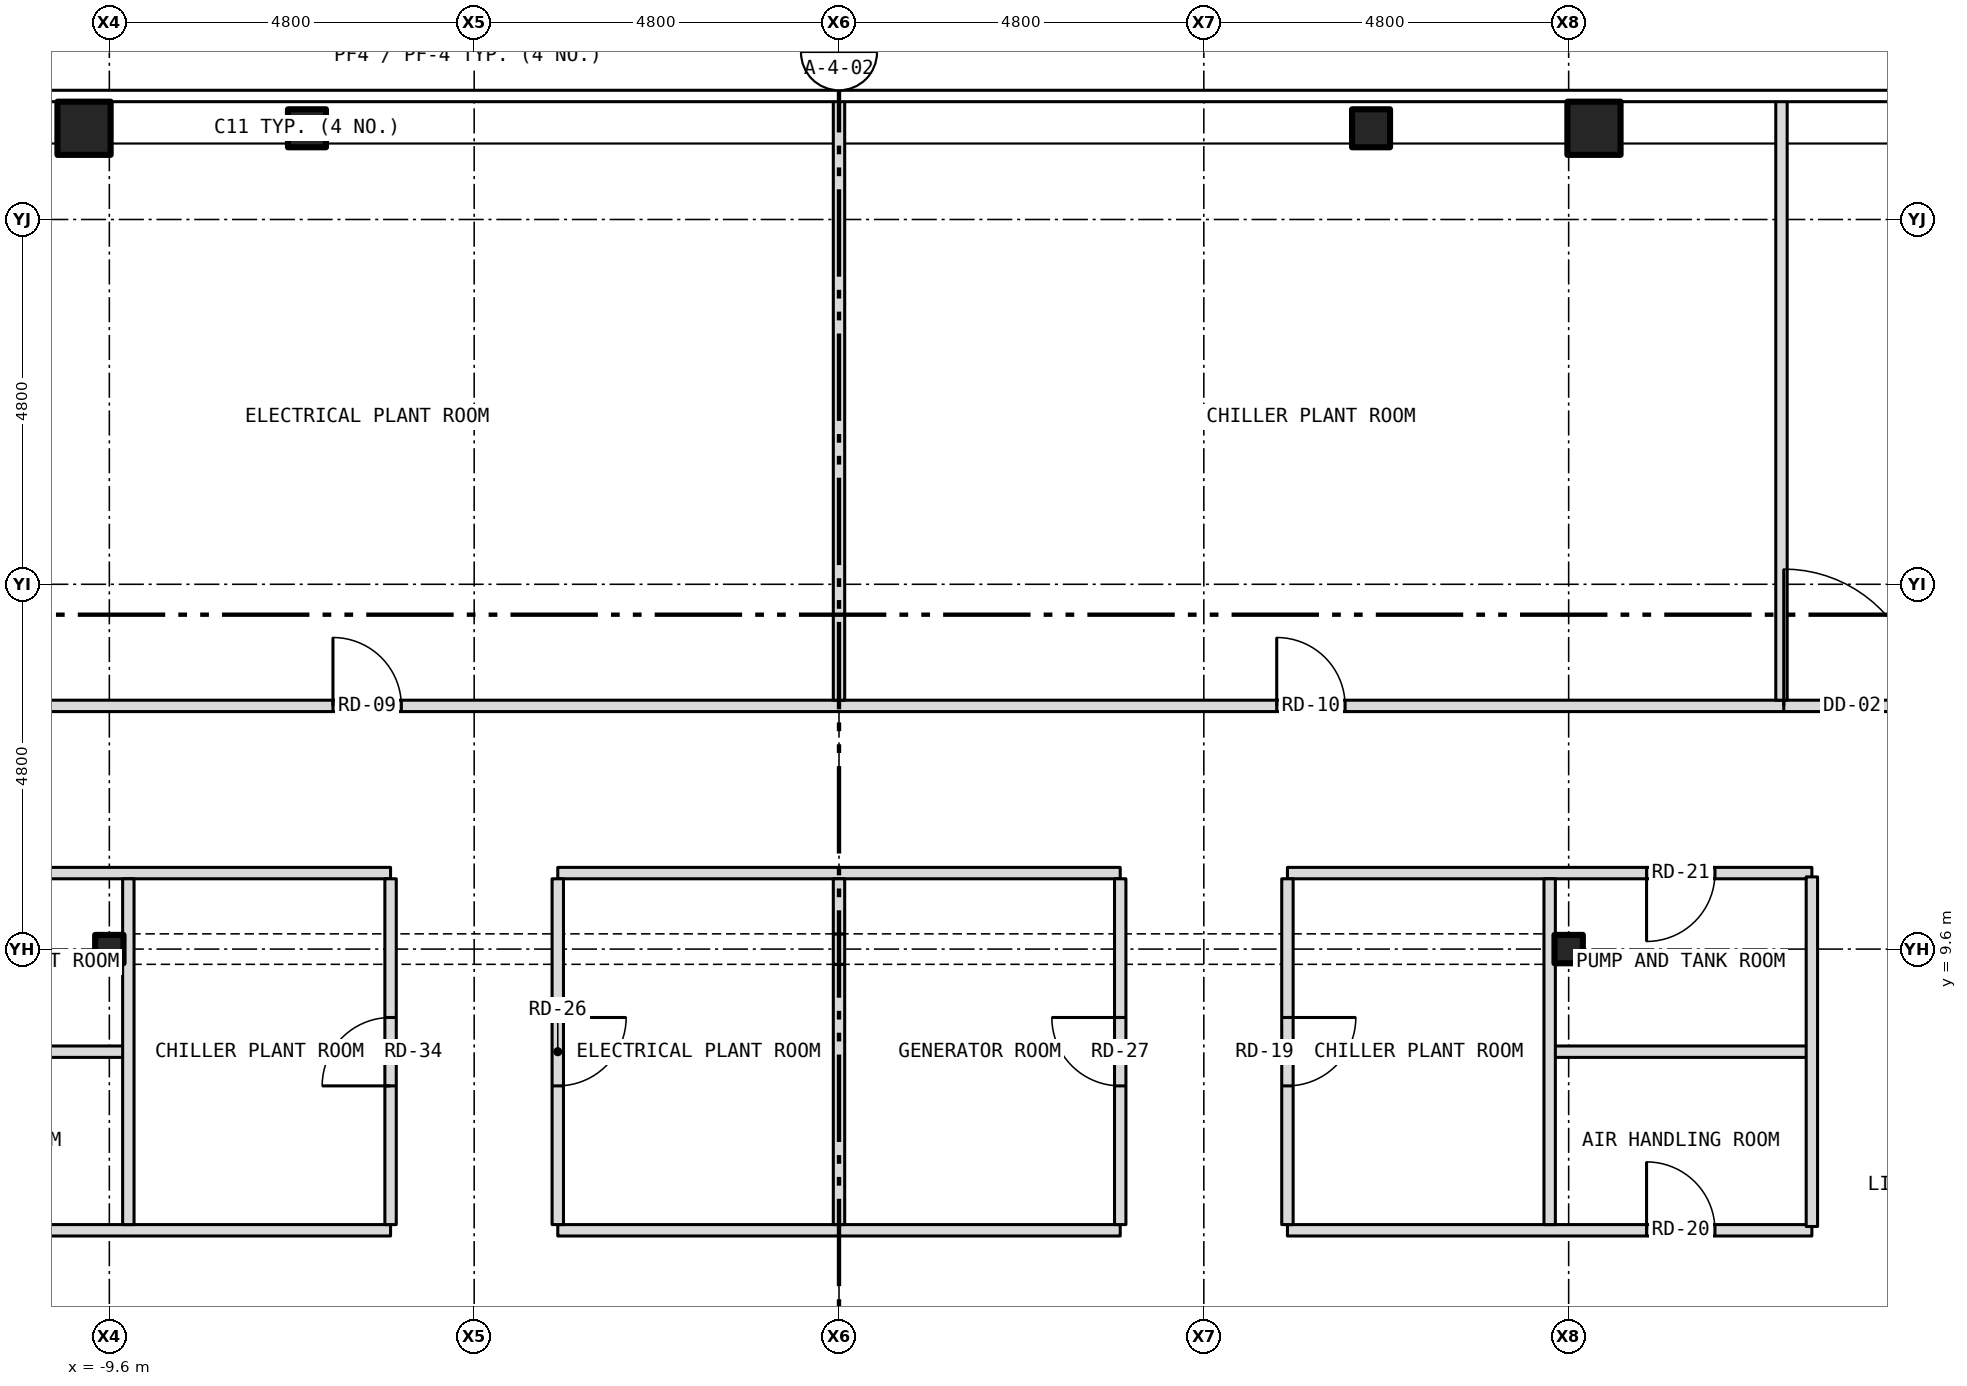
"""IFC4 building model, lengths in metres.
Left out: names, types, materials, properties, quantities, classifications, styles, units other than length and angle.
Written with IfcOpenShell. Run it as: python <this file> out.ifc"""

import sys

from ifc_helpers import new_model, si_unit, direction, frame, frame_2d, origin, origin_2d, place, context, subcontext, project, spatial, rectangle, hollow_rectangle, i_section, extrude, element, fill, save


model = new_model("IFC4")
c1 = context("Model", 3, precision=1e-05, world=origin(), true_north=direction((0.0, 1.0)))
c2 = subcontext(c1, "Body", "Model", "MODEL_VIEW")
j1 = project(units=[si_unit("LENGTHUNIT", "METRE"), si_unit("PLANEANGLEUNIT", "RADIAN")], contexts=[c1])
p1 = place(None, origin())
s1 = spatial("IfcSite", under=j1, at=p1, CompositionType="ELEMENT")
p2 = place(p1, origin())
s2 = spatial("IfcBuilding", under=s1, at=p2, CompositionType="ELEMENT")
p3 = place(p2, frame((0.0, 0.0, 236.5)))
s3 = spatial("IfcBuildingStorey", under=s2, at=p3, CompositionType="ELEMENT", Elevation=236.5)
for number, where, z_axis, x_axis in (
    (1, (-9.933, 20.4, -0.3), (0.0, 0.0, 1.0), (1.0, 0.0, 0.0)),
    (2, (9.933, 20.4, -0.3), (0.0, 0.0, 1.0), (1.0, 0.0, 0.0)),
):
    element("IfcColumn", number, at=place(p3, frame(where, z_axis=z_axis, x_axis=x_axis)), inside=s3, PredefinedType="COLUMN", context=c2, shape_type="SweptSolid", body=[
        extrude(hollow_rectangle(XDim=0.7, YDim=0.7, WallThickness=0.04, at=origin_2d()), origin(), (0.0, 0.0, 1.0), 4.65),
    ])
for number, where, z_axis, x_axis in (
    (3, (-7.0, 20.4, -0.3), (0.0, 0.0, 1.0), (1.0, 0.0, 0.0)),
    (4, (7.0, 20.4, -0.3), (0.0, 0.0, 1.0), (1.0, 0.0, 0.0)),
):
    element("IfcColumn", number, at=place(p3, frame(where, z_axis=z_axis, x_axis=x_axis)), inside=s3, PredefinedType="COLUMN", context=c2, shape_type="SweptSolid", body=[
        extrude(hollow_rectangle(XDim=0.5, YDim=0.5, WallThickness=0.03, at=origin_2d()), origin(), (0.0, 0.0, 1.0), 4.65),
    ])
for number, where, z_axis, x_axis in (
    (5, (-9.6, 9.6, -0.3), (0.0, 0.0, 1.0), (1.0, 0.0, 0.0)),
    (6, (9.6, 9.6, -0.3), (0.0, 0.0, 1.0), (1.0, 0.0, 0.0)),
):
    element("IfcColumn", number, at=place(p3, frame(where, z_axis=z_axis, x_axis=x_axis)), inside=s3, PredefinedType="COLUMN", context=c2, shape_type="SweptSolid", body=[
        extrude(i_section(OverallWidth=0.373, OverallDepth=0.373, WebThickness=0.016, FlangeThickness=0.026, at=origin_2d()), origin(), (0.0, 0.0, 1.0), 4.65),
    ])
p4 = place(p3, frame((-12.8, 5.9, 0.0), z_axis=(0.0, 0.0, 1.0), x_axis=(1.0, 0.0, 0.0)))
e7 = element("IfcWall", 7, at=p4, inside=s3, PredefinedType="PARTITIONING", context=c2, shape_type="SweptSolid", body=[
    extrude(rectangle(XDim=6.9, YDim=0.15, at=frame_2d((3.45, 0.0))), origin(), (0.0, 0.0, 1.0), 4.35),
])
p5 = place(p4, frame((1.275, 0.0, 0.0)))
e8 = element("IfcOpeningElement", 8, at=p5, cuts=e7, PredefinedType="OPENING", context=c2, shape_type="SweptSolid", body=[
    extrude(rectangle(XDim=0.9, YDim=2.1, at=frame_2d((0.45, 1.05))), frame((0.0, 0.087, 0.0), z_axis=(0.0, -1.0, 0.0), x_axis=(1.0, 0.0, 0.0)), (0.0, 0.0, 1.0), 0.174),
])
p6 = place(p3, frame((-3.7, 5.9, 0.0), z_axis=(0.0, 0.0, 1.0), x_axis=(1.0, 0.0, 0.0)))
e9 = element("IfcWall", 9, at=p6, inside=s3, PredefinedType="PARTITIONING", context=c2, shape_type="SweptSolid", body=[
    extrude(rectangle(XDim=7.4, YDim=0.15, at=frame_2d((3.7, 0.0))), origin(), (0.0, 0.0, 1.0), 4.35),
])
p7 = place(p3, frame((5.9, 5.9, 0.0), z_axis=(0.0, 0.0, 1.0), x_axis=(1.0, 0.0, 0.0)))
e10 = element("IfcWall", 10, at=p7, inside=s3, PredefinedType="PARTITIONING", context=c2, shape_type="SweptSolid", body=[
    extrude(rectangle(XDim=6.9, YDim=0.15, at=frame_2d((3.45, 0.0))), origin(), (0.0, 0.0, 1.0), 4.35),
])
p8 = place(p7, frame((4.725, 0.0, 0.0)))
e11 = element("IfcOpeningElement", 11, at=p8, cuts=e10, PredefinedType="OPENING", context=c2, shape_type="SweptSolid", body=[
    extrude(rectangle(XDim=0.9, YDim=2.1, at=frame_2d((0.45, 1.05))), frame((0.0, 0.087, 0.0), z_axis=(0.0, -1.0, 0.0), x_axis=(1.0, 0.0, 0.0)), (0.0, 0.0, 1.0), 0.174),
])
for number, where, z_axis, x_axis in (
    (12, (-12.8, 8.25, 0.0), (0.0, 0.0, 1.0), (1.0, 0.0, 0.0)),
    (13, (9.35, 8.25, 0.0), (0.0, 0.0, 1.0), (1.0, 0.0, 0.0)),
):
    element("IfcWall", number, at=place(p3, frame(where, z_axis=z_axis, x_axis=x_axis)), inside=s3, PredefinedType="PARTITIONING", context=c2, shape_type="SweptSolid", body=[
        extrude(rectangle(XDim=3.45, YDim=0.15, at=frame_2d((1.725, 0.0))), origin(), (0.0, 0.0, 1.0), 4.35),
    ])
p9 = place(p3, frame((-12.8, 10.6, 0.0), z_axis=(0.0, 0.0, 1.0), x_axis=(1.0, 0.0, 0.0)))
e14 = element("IfcWall", 14, at=p9, inside=s3, PredefinedType="PARTITIONING", context=c2, shape_type="SweptSolid", body=[
    extrude(rectangle(XDim=6.9, YDim=0.15, at=frame_2d((3.45, 0.0))), origin(), (0.0, 0.0, 1.0), 4.35),
])
p10 = place(p9, frame((1.275, 0.0, 0.0)))
e15 = element("IfcOpeningElement", 15, at=p10, cuts=e14, PredefinedType="OPENING", context=c2, shape_type="SweptSolid", body=[
    extrude(rectangle(XDim=0.9, YDim=2.1, at=frame_2d((0.45, 1.05))), frame((0.0, 0.087, 0.0), z_axis=(0.0, -1.0, 0.0), x_axis=(1.0, 0.0, 0.0)), (0.0, 0.0, 1.0), 0.174),
])
p11 = place(p3, frame((-3.7, 10.6, 0.0), z_axis=(0.0, 0.0, 1.0), x_axis=(1.0, 0.0, 0.0)))
e16 = element("IfcWall", 16, at=p11, inside=s3, PredefinedType="PARTITIONING", context=c2, shape_type="SweptSolid", body=[
    extrude(rectangle(XDim=7.4, YDim=0.15, at=frame_2d((3.7, 0.0))), origin(), (0.0, 0.0, 1.0), 4.35),
])
p12 = place(p3, frame((5.9, 10.6, 0.0), z_axis=(0.0, 0.0, 1.0), x_axis=(1.0, 0.0, 0.0)))
e17 = element("IfcWall", 17, at=p12, inside=s3, PredefinedType="PARTITIONING", context=c2, shape_type="SweptSolid", body=[
    extrude(rectangle(XDim=6.9, YDim=0.15, at=frame_2d((3.45, 0.0))), origin(), (0.0, 0.0, 1.0), 4.35),
])
p13 = place(p12, frame((4.725, 0.0, 0.0)))
e18 = element("IfcOpeningElement", 18, at=p13, cuts=e17, PredefinedType="OPENING", context=c2, shape_type="SweptSolid", body=[
    extrude(rectangle(XDim=0.9, YDim=2.1, at=frame_2d((0.45, 1.05))), frame((0.0, 0.087, 0.0), z_axis=(0.0, -1.0, 0.0), x_axis=(1.0, 0.0, 0.0)), (0.0, 0.0, 1.0), 0.174),
])
p14 = place(p3, frame((-15.8, 12.8, 0.0), z_axis=(0.0, 0.0, 1.0), x_axis=(1.0, 0.0, 0.0)))
e19 = element("IfcWall", 19, at=p14, inside=s3, PredefinedType="PARTITIONING", context=c2, shape_type="SweptSolid", body=[
    extrude(rectangle(XDim=31.6, YDim=0.15, at=frame_2d((15.8, 0.0))), origin(), (0.0, 0.0, 1.0), 4.35),
])
p15 = place(p14, frame((9.142, 0.0, 0.0)))
e20 = element("IfcOpeningElement", 20, at=p15, cuts=e19, PredefinedType="OPENING", context=c2, shape_type="SweptSolid", body=[
    extrude(rectangle(XDim=0.9, YDim=2.1, at=frame_2d((0.45, 1.05))), frame((0.0, 0.087, 0.0), z_axis=(0.0, -1.0, 0.0), x_axis=(1.0, 0.0, 0.0)), (0.0, 0.0, 1.0), 0.174),
])
p16 = place(p14, frame((21.559, 0.0, 0.0)))
e21 = element("IfcOpeningElement", 21, at=p16, cuts=e19, PredefinedType="OPENING", context=c2, shape_type="SweptSolid", body=[
    extrude(rectangle(XDim=0.9, YDim=2.1, at=frame_2d((0.45, 1.05))), frame((0.0, 0.087, 0.0), z_axis=(0.0, -1.0, 0.0), x_axis=(1.0, 0.0, 0.0)), (0.0, 0.0, 1.0), 0.174),
])
p17 = place(p14, frame((1.58, 0.0, 0.0)))
e22 = element("IfcOpeningElement", 22, at=p17, cuts=e19, PredefinedType="OPENING", context=c2, shape_type="SweptSolid", body=[
    extrude(rectangle(XDim=1.8, YDim=2.1, at=frame_2d((0.9, 1.05))), frame((0.0, 0.087, 0.0), z_axis=(0.0, -1.0, 0.0), x_axis=(1.0, 0.0, 0.0)), (0.0, 0.0, 1.0), 0.174),
])
p18 = place(p14, frame((28.23, 0.0, 0.0)))
e23 = element("IfcOpeningElement", 23, at=p18, cuts=e19, PredefinedType="OPENING", context=c2, shape_type="SweptSolid", body=[
    extrude(rectangle(XDim=1.8, YDim=2.1, at=frame_2d((0.9, 1.05))), frame((0.0, 0.087, 0.0), z_axis=(0.0, -1.0, 0.0), x_axis=(1.0, 0.0, 0.0)), (0.0, 0.0, 1.0), 0.174),
])
p19 = place(p3, frame((-9.35, 5.975, 0.0), z_axis=(0.0, 0.0, 1.0), x_axis=(0.0, 1.0, 0.0)))
e24 = element("IfcWall", 24, at=p19, inside=s3, PredefinedType="PARTITIONING", context=c2, shape_type="SweptSolid", body=[
    extrude(rectangle(XDim=4.55, YDim=0.15, at=frame_2d((2.275, 0.0))), origin(), (0.0, 0.0, 1.0), 4.35),
])
p20 = place(p3, frame((-5.9, 5.975, 0.0), z_axis=(0.0, 0.0, 1.0), x_axis=(0.0, 1.0, 0.0)))
e25 = element("IfcWall", 25, at=p20, inside=s3, PredefinedType="PARTITIONING", context=c2, shape_type="SweptSolid", body=[
    extrude(rectangle(XDim=4.55, YDim=0.15, at=frame_2d((2.275, 0.0))), origin(), (0.0, 0.0, 1.0), 4.35),
])
p21 = place(p20, frame((1.825, 0.0, 0.0)))
e26 = element("IfcOpeningElement", 26, at=p21, cuts=e25, PredefinedType="OPENING", context=c2, shape_type="SweptSolid", body=[
    extrude(rectangle(XDim=0.9, YDim=2.1, at=frame_2d((0.45, 1.05))), frame((0.0, 0.087, 0.0), z_axis=(0.0, -1.0, 0.0), x_axis=(1.0, 0.0, 0.0)), (0.0, 0.0, 1.0), 0.174),
])
p22 = place(p3, frame((-3.7, 5.975, 0.0), z_axis=(0.0, 0.0, 1.0), x_axis=(0.0, 1.0, 0.0)))
e27 = element("IfcWall", 27, at=p22, inside=s3, PredefinedType="PARTITIONING", context=c2, shape_type="SweptSolid", body=[
    extrude(rectangle(XDim=4.55, YDim=0.15, at=frame_2d((2.275, 0.0))), origin(), (0.0, 0.0, 1.0), 4.35),
])
p23 = place(p22, frame((1.825, 0.0, 0.0)))
e28 = element("IfcOpeningElement", 28, at=p23, cuts=e27, PredefinedType="OPENING", context=c2, shape_type="SweptSolid", body=[
    extrude(rectangle(XDim=0.9, YDim=2.1, at=frame_2d((0.45, 1.05))), frame((0.0, 0.087, 0.0), z_axis=(0.0, -1.0, 0.0), x_axis=(1.0, 0.0, 0.0)), (0.0, 0.0, 1.0), 0.174),
])
p24 = place(p3, frame((0.0, 5.975, 0.0), z_axis=(0.0, 0.0, 1.0), x_axis=(0.0, 1.0, 0.0)))
e29 = element("IfcWall", 29, at=p24, inside=s3, PredefinedType="PARTITIONING", context=c2, shape_type="SweptSolid", body=[
    extrude(rectangle(XDim=3.424, YDim=0.15, at=frame_2d((1.712, 0.0))), origin(), (0.0, 0.0, 1.0), 3.728),
])
p25 = place(p3, frame((0.0, 9.399, 0.0), z_axis=(0.0, 0.0, 1.0), x_axis=(0.0, 1.0, 0.0)))
e30 = element("IfcWall", 30, at=p25, inside=s3, PredefinedType="PARTITIONING", context=c2, shape_type="SweptSolid", body=[
    extrude(rectangle(XDim=0.401, YDim=0.15, at=frame_2d((0.201, 0.0))), origin(), (0.0, 0.0, 1.0), 4.35),
])
p26 = place(p3, frame((0.0, 9.8, 0.0), z_axis=(0.0, 0.0, 1.0), x_axis=(0.0, 1.0, 0.0)))
e31 = element("IfcWall", 31, at=p26, inside=s3, PredefinedType="PARTITIONING", context=c2, shape_type="SweptSolid", body=[
    extrude(rectangle(XDim=0.725, YDim=0.15, at=frame_2d((0.362, 0.0))), origin(), (0.0, 0.0, 1.0), 3.728),
])
p27 = place(p3, frame((0.0, 12.875, 0.0), z_axis=(0.0, 0.0, 1.0), x_axis=(0.0, 1.0, 0.0)))
e32 = element("IfcWall", 32, at=p27, inside=s3, PredefinedType="PARTITIONING", context=c2, shape_type="SweptSolid", body=[
    extrude(rectangle(XDim=7.905, YDim=0.15, at=frame_2d((3.953, 0.0))), origin(), (0.0, 0.0, 1.0), 3.728),
])
p28 = place(p3, frame((3.7, 5.975, 0.0), z_axis=(0.0, 0.0, 1.0), x_axis=(0.0, 1.0, 0.0)))
e33 = element("IfcWall", 33, at=p28, inside=s3, PredefinedType="PARTITIONING", context=c2, shape_type="SweptSolid", body=[
    extrude(rectangle(XDim=4.55, YDim=0.15, at=frame_2d((2.275, 0.0))), origin(), (0.0, 0.0, 1.0), 4.35),
])
p29 = place(p28, frame((1.825, 0.0, 0.0)))
e34 = element("IfcOpeningElement", 34, at=p29, cuts=e33, PredefinedType="OPENING", context=c2, shape_type="SweptSolid", body=[
    extrude(rectangle(XDim=0.9, YDim=2.1, at=frame_2d((0.45, 1.05))), frame((0.0, 0.087, 0.0), z_axis=(0.0, -1.0, 0.0), x_axis=(1.0, 0.0, 0.0)), (0.0, 0.0, 1.0), 0.174),
])
p30 = place(p3, frame((5.9, 5.975, 0.0), z_axis=(0.0, 0.0, 1.0), x_axis=(0.0, 1.0, 0.0)))
e35 = element("IfcWall", 35, at=p30, inside=s3, PredefinedType="PARTITIONING", context=c2, shape_type="SweptSolid", body=[
    extrude(rectangle(XDim=4.55, YDim=0.15, at=frame_2d((2.275, 0.0))), origin(), (0.0, 0.0, 1.0), 4.35),
])
p31 = place(p30, frame((1.825, 0.0, 0.0)))
e36 = element("IfcOpeningElement", 36, at=p31, cuts=e35, PredefinedType="OPENING", context=c2, shape_type="SweptSolid", body=[
    extrude(rectangle(XDim=0.9, YDim=2.1, at=frame_2d((0.45, 1.05))), frame((0.0, 0.087, 0.0), z_axis=(0.0, -1.0, 0.0), x_axis=(1.0, 0.0, 0.0)), (0.0, 0.0, 1.0), 0.174),
])
p32 = place(p3, frame((9.35, 5.975, 0.0), z_axis=(0.0, 0.0, 1.0), x_axis=(0.0, 1.0, 0.0)))
e37 = element("IfcWall", 37, at=p32, inside=s3, PredefinedType="PARTITIONING", context=c2, shape_type="SweptSolid", body=[
    extrude(rectangle(XDim=4.55, YDim=0.15, at=frame_2d((2.275, 0.0))), origin(), (0.0, 0.0, 1.0), 4.35),
])
p33 = place(p3, frame((12.4, 12.875, 0.0), z_axis=(0.0, 0.0, 1.0), x_axis=(0.0, 1.0, 0.0)))
e38 = element("IfcWall", 38, at=p33, inside=s3, PredefinedType="PARTITIONING", context=c2, shape_type="SweptSolid", body=[
    extrude(rectangle(XDim=7.905, YDim=0.15, at=frame_2d((3.953, 0.0))), origin(), (0.0, 0.0, 1.0), 4.35),
])
p34 = place(p3, frame((12.8, 5.95, 0.0), z_axis=(0.0, 0.0, 1.0), x_axis=(0.0, 1.0, 0.0)))
e39 = element("IfcWall", 39, at=p34, inside=s3, PredefinedType="PARTITIONING", context=c2, shape_type="SweptSolid", body=[
    extrude(rectangle(XDim=4.6, YDim=0.15, at=frame_2d((2.3, 0.0))), origin(), (0.0, 0.0, 1.0), 4.35),
])
p35 = place(p15, origin())
e40 = element("IfcDoor", 40, at=p35, inside=s3, OperationType="SINGLE_SWING_LEFT", PredefinedType="DOOR", context=c2, shape_type="SweptSolid", body=[
    extrude(rectangle(XDim=0.9, YDim=2.1, at=frame_2d((0.45, 1.05))), frame((0.0, 0.025, 0.0), z_axis=(0.0, -1.0, 0.0), x_axis=(1.0, 0.0, 0.0)), (0.0, 0.0, 1.0), 0.05),
])
fill(e20, e40)
p36 = place(p16, origin())
e41 = element("IfcDoor", 41, at=p36, inside=s3, OperationType="SINGLE_SWING_LEFT", PredefinedType="DOOR", context=c2, shape_type="SweptSolid", body=[
    extrude(rectangle(XDim=0.9, YDim=2.1, at=frame_2d((0.45, 1.05))), frame((0.0, 0.025, 0.0), z_axis=(0.0, -1.0, 0.0), x_axis=(1.0, 0.0, 0.0)), (0.0, 0.0, 1.0), 0.05),
])
fill(e21, e41)
p37 = place(p18, origin())
e42 = element("IfcDoor", 42, at=p37, inside=s3, OperationType="DOUBLE_DOOR_SINGLE_SWING", PredefinedType="DOOR", context=c2, shape_type="SweptSolid", body=[
    extrude(rectangle(XDim=1.8, YDim=2.1, at=frame_2d((0.9, 1.05))), frame((0.0, 0.025, 0.0), z_axis=(0.0, -1.0, 0.0), x_axis=(1.0, 0.0, 0.0)), (0.0, 0.0, 1.0), 0.05),
])
fill(e23, e42)
p38 = place(p31, origin())
e43 = element("IfcDoor", 43, at=p38, inside=s3, OperationType="SINGLE_SWING_RIGHT", PredefinedType="DOOR", context=c2, shape_type="SweptSolid", body=[
    extrude(rectangle(XDim=0.9, YDim=2.1, at=frame_2d((0.45, 1.05))), frame((0.0, 0.025, 0.0), z_axis=(0.0, -1.0, 0.0), x_axis=(1.0, 0.0, 0.0)), (0.0, 0.0, 1.0), 0.05),
])
fill(e36, e43)
p39 = place(p8, origin())
e44 = element("IfcDoor", 44, at=p39, inside=s3, OperationType="SINGLE_SWING_LEFT", PredefinedType="DOOR", context=c2, shape_type="SweptSolid", body=[
    extrude(rectangle(XDim=0.9, YDim=2.1, at=frame_2d((0.45, 1.05))), frame((0.0, 0.025, 0.0), z_axis=(0.0, -1.0, 0.0), x_axis=(1.0, 0.0, 0.0)), (0.0, 0.0, 1.0), 0.05),
])
fill(e11, e44)
p40 = place(p13, origin())
e45 = element("IfcDoor", 45, at=p40, inside=s3, OperationType="SINGLE_SWING_LEFT", PredefinedType="DOOR", context=c2, shape_type="SweptSolid", body=[
    extrude(rectangle(XDim=0.9, YDim=2.1, at=frame_2d((0.45, 1.05))), frame((0.0, 0.025, 0.0), z_axis=(0.0, -1.0, 0.0), x_axis=(1.0, 0.0, 0.0)), (0.0, 0.0, 1.0), 0.05),
])
fill(e18, e45)
p41 = place(p23, origin())
e46 = element("IfcDoor", 46, at=p41, inside=s3, OperationType="SINGLE_SWING_RIGHT", PredefinedType="DOOR", context=c2, shape_type="SweptSolid", body=[
    extrude(rectangle(XDim=0.9, YDim=2.1, at=frame_2d((0.45, 1.05))), frame((0.0, 0.025, 0.0), z_axis=(0.0, -1.0, 0.0), x_axis=(1.0, 0.0, 0.0)), (0.0, 0.0, 1.0), 0.05),
])
fill(e28, e46)
p42 = place(p29, origin())
e47 = element("IfcDoor", 47, at=p42, inside=s3, OperationType="SINGLE_SWING_RIGHT", PredefinedType="DOOR", context=c2, shape_type="SweptSolid", body=[
    extrude(rectangle(XDim=0.9, YDim=2.1, at=frame_2d((0.45, 1.05))), frame((0.0, 0.025, 0.0), z_axis=(0.0, -1.0, 0.0), x_axis=(1.0, 0.0, 0.0)), (0.0, 0.0, 1.0), 0.05),
])
fill(e34, e47)
p43 = place(p21, origin())
e48 = element("IfcDoor", 48, at=p43, inside=s3, OperationType="SINGLE_SWING_LEFT", PredefinedType="DOOR", context=c2, shape_type="SweptSolid", body=[
    extrude(rectangle(XDim=0.9, YDim=2.1, at=frame_2d((0.45, 1.05))), frame((0.0, 0.025, 0.0), z_axis=(0.0, -1.0, 0.0), x_axis=(1.0, 0.0, 0.0)), (0.0, 0.0, 1.0), 0.05),
])
fill(e26, e48)
save(model, sys.argv[1])
